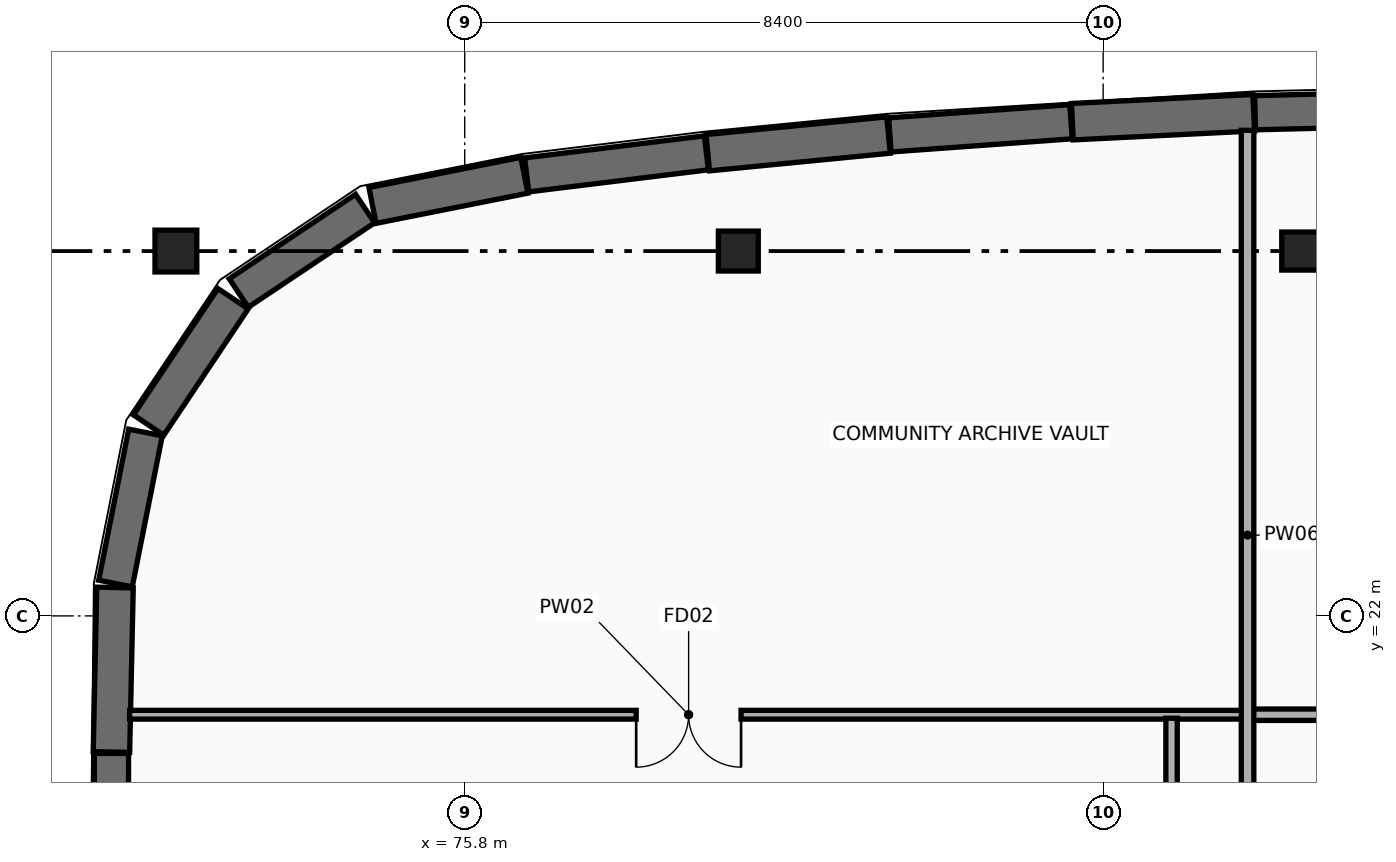
"""IFC4 building model, lengths in metres.
Left out: names, types, materials, properties, quantities, classifications, styles, units other than length and angle.
Written with IfcOpenShell. Run it as: python <this file> out.ifc"""

import sys

from ifc_helpers import new_model, si_unit, direction, frame, frame_2d, origin, origin_2d, place, context, subcontext, project, spatial, rectangle, extrude, element, fill, save


model = new_model("IFC4")
c1 = context("Model", 3, precision=1e-05, world=origin(), true_north=direction((0.0, 1.0)))
c2 = subcontext(c1, "Body", "Model", "MODEL_VIEW")
j1 = project(units=[si_unit("LENGTHUNIT", "METRE"), si_unit("PLANEANGLEUNIT", "RADIAN")], contexts=[c1])
p1 = place(None, origin())
s1 = spatial("IfcSite", under=j1, at=p1, CompositionType="ELEMENT")
p2 = place(p1, origin())
s2 = spatial("IfcBuilding", under=s1, at=p2, CompositionType="ELEMENT")
p3 = place(p2, frame((0.0, 0.0, -4.2)))
s3 = spatial("IfcBuildingStorey", under=s2, at=p3, CompositionType="ELEMENT", Elevation=-4.2)
p4 = place(p3, frame((72.0, 26.8, -0.415), z_axis=(0.0, 0.0, 1.0), x_axis=(1.0, 0.0, 0.0)))
e1 = element("IfcColumn", 1, at=p4, inside=s3, PredefinedType="COLUMN", context=c2, shape_type="SweptSolid", body=[
    extrude(rectangle(XDim=0.55, YDim=0.55, at=origin_2d()), origin(), (0.0, 0.0, 1.0), 4.615),
])
p5 = place(p3, frame((79.4, 26.8, -0.415), z_axis=(0.0, 0.0, 1.0), x_axis=(1.0, 0.0, 0.0)))
e2 = element("IfcColumn", 2, at=p5, inside=s3, PredefinedType="COLUMN", context=c2, shape_type="SweptSolid", body=[
    extrude(rectangle(XDim=0.525, YDim=0.525, at=origin_2d()), origin(), (0.0, 0.0, 1.0), 4.615),
])
p6 = place(p3, frame((86.8, 26.8, -0.415), z_axis=(0.0, 0.0, 1.0), x_axis=(1.0, 0.0, 0.0)))
e3 = element("IfcColumn", 3, at=p6, inside=s3, PredefinedType="COLUMN", context=c2, shape_type="SweptSolid", body=[
    extrude(rectangle(XDim=0.5, YDim=0.5, at=origin_2d()), origin(), (0.0, 0.0, 1.0), 4.615),
])
p7 = place(p3, frame((86.199, 28.62, 0.0), z_axis=(0.0, 0.0, 1.0), x_axis=(0.999706566975, 0.024223541189, 0.0)))
e4 = element("IfcWall", 4, at=p7, inside=s3, PredefinedType="STANDARD", context=c2, shape_type="SweptSolid", body=[
    extrude(rectangle(XDim=2.389, YDim=0.45, at=frame_2d((1.194, 0.0))), origin(), (0.0, 0.0, 1.0), 3.897),
])
p8 = place(p3, frame((83.795, 28.502, 0.0), z_axis=(0.0, 0.0, 1.0), x_axis=(0.998775928043, 0.049463578141, 0.0)))
e5 = element("IfcWall", 5, at=p8, inside=s3, PredefinedType="STANDARD", context=c2, shape_type="SweptSolid", body=[
    extrude(rectangle(XDim=2.389, YDim=0.48, at=frame_2d((1.194, 0.0))), origin(), (0.0, 0.0, 1.0), 3.897),
])
p9 = place(p3, frame((81.394, 28.328, 0.0), z_axis=(0.0, 0.0, 1.0), x_axis=(0.997372398559, 0.07244514195, 0.0)))
e6 = element("IfcWall", 6, at=p9, inside=s3, PredefinedType="STANDARD", context=c2, shape_type="SweptSolid", body=[
    extrude(rectangle(XDim=2.389, YDim=0.45, at=frame_2d((1.195, 0.0))), origin(), (0.0, 0.0, 1.0), 3.897),
])
p10 = place(p3, frame((78.998, 28.094, 0.0), z_axis=(0.0, 0.0, 1.0), x_axis=(0.995277042211, 0.097075276191, 0.0)))
e7 = element("IfcWall", 7, at=p10, inside=s3, PredefinedType="STANDARD", context=c2, shape_type="SweptSolid", body=[
    extrude(rectangle(XDim=2.389, YDim=0.48, at=frame_2d((1.195, 0.0))), origin(), (0.0, 0.0, 1.0), 3.897),
])
p11 = place(p3, frame((76.615, 27.802, 0.0), z_axis=(0.0, 0.0, 1.0), x_axis=(0.99256366712, 0.121726606435, 0.0)))
e8 = element("IfcWall", 8, at=p11, inside=s3, PredefinedType="STANDARD", context=c2, shape_type="SweptSolid", body=[
    extrude(rectangle(XDim=2.383, YDim=0.45, at=frame_2d((1.191, 0.0))), origin(), (0.0, 0.0, 1.0), 3.897),
])
p12 = place(p3, frame((74.587, 27.4, 0.0), z_axis=(0.0, 0.0, 1.0), x_axis=(0.980805885843, 0.194986702867, 0.0)))
e9 = element("IfcWall", 9, at=p12, inside=s3, PredefinedType="STANDARD", context=c2, shape_type="SweptSolid", body=[
    extrude(rectangle(XDim=2.037, YDim=0.48, at=frame_2d((1.019, 0.0))), origin(), (0.0, 0.0, 1.0), 3.897),
])
p13 = place(p3, frame((72.827, 26.248, 0.0), z_axis=(0.0, 0.0, 1.0), x_axis=(0.831410947249, 0.555658021443, 0.0)))
e10 = element("IfcWall", 10, at=p13, inside=s3, PredefinedType="STANDARD", context=c2, shape_type="SweptSolid", body=[
    extrude(rectangle(XDim=1.999, YDim=0.45, at=frame_2d((1.0, 0.0))), origin(), (0.0, 0.0, 1.0), 3.897),
])
p14 = place(p3, frame((71.641, 24.511, 0.0), z_axis=(0.0, 0.0, 1.0), x_axis=(0.555658021443, 0.831410947249, 0.0)))
e11 = element("IfcWall", 11, at=p14, inside=s3, PredefinedType="STANDARD", context=c2, shape_type="SweptSolid", body=[
    extrude(rectangle(XDim=1.999, YDim=0.48, at=frame_2d((1.0, 0.0))), origin(), (0.0, 0.0, 1.0), 3.897),
])
p15 = place(p3, frame((71.205, 22.426, 0.0), z_axis=(0.0, 0.0, 1.0), x_axis=(0.194980456149, 0.980807127686, 0.0)))
e12 = element("IfcWall", 12, at=p15, inside=s3, PredefinedType="STANDARD", context=c2, shape_type="SweptSolid", body=[
    extrude(rectangle(XDim=2.026, YDim=0.45, at=frame_2d((1.013, 0.0))), origin(), (0.0, 0.0, 1.0), 3.897),
])
p16 = place(p3, frame((71.152, 20.209, 0.0), z_axis=(0.0, 0.0, 1.0), x_axis=(0.021655570194, 0.999765490642, 0.0)))
e13 = element("IfcWall", 13, at=p16, inside=s3, PredefinedType="STANDARD", context=c2, shape_type="SweptSolid", body=[
    extrude(rectangle(XDim=2.165, YDim=0.48, at=frame_2d((1.082, 0.0))), origin(), (0.0, 0.0, 1.0), 3.897),
])
p17 = place(p3, frame((71.152, 18.009, 0.0), z_axis=(0.0, 0.0, 1.0), x_axis=(0.0, 1.0, 0.0)))
e14 = element("IfcWall", 14, at=p17, inside=s3, PredefinedType="STANDARD", context=c2, shape_type="SweptSolid", body=[
    extrude(rectangle(XDim=2.182, YDim=0.45, at=frame_2d((1.091, 0.0))), origin(), (0.0, 0.0, 1.0), 3.897),
])
p18 = place(p3, frame((86.1, 20.7, 0.0), z_axis=(0.0, 0.0, 1.0), x_axis=(-1.0, 0.0, 0.0)))
e15 = element("IfcWall", 15, at=p18, inside=s3, PredefinedType="PARTITIONING", context=c2, shape_type="SweptSolid", body=[
    extrude(rectangle(XDim=14.709, YDim=0.115, at=frame_2d((7.354, 0.0))), origin(), (0.0, 0.0, 1.0), 3.335),
])
p19 = place(p18, frame((6.664, 0.0, 0.0)))
e16 = element("IfcOpeningElement", 16, at=p19, cuts=e15, PredefinedType="OPENING", context=c2, shape_type="SweptSolid", body=[
    extrude(rectangle(XDim=1.38, YDim=2.2, at=frame_2d((0.69, 1.1))), frame((0.0, 0.067, 0.0), z_axis=(0.0, -1.0, 0.0), x_axis=(1.0, 0.0, 0.0)), (0.0, 0.0, 1.0), 0.135),
])
p20 = place(p3, frame((102.462, 20.7, 0.0), z_axis=(0.0, 0.0, 1.0), x_axis=(-1.0, 0.0, 0.0)))
e17 = element("IfcWall", 17, at=p20, inside=s3, PredefinedType="PARTITIONING", context=c2, shape_type="SweptSolid", body=[
    extrude(rectangle(XDim=16.362, YDim=0.15, at=frame_2d((8.181, 0.0))), origin(), (0.0, 0.0, 1.0), 3.235),
])
p21 = place(p20, frame((7.441, 0.0, 0.0)))
e18 = element("IfcOpeningElement", 18, at=p21, cuts=e17, PredefinedType="OPENING", context=c2, shape_type="SweptSolid", body=[
    extrude(rectangle(XDim=1.48, YDim=2.22, at=frame_2d((0.74, 1.11))), frame((0.0, 0.085, 0.0), z_axis=(0.0, -1.0, 0.0), x_axis=(1.0, 0.0, 0.0)), (0.0, 0.0, 1.0), 0.17),
])
p22 = place(p3, frame((85.1, 9.862, 0.0), z_axis=(0.0, 0.0, 1.0), x_axis=(0.0, 1.0, 0.0)))
e19 = element("IfcWall", 19, at=p22, inside=s3, PredefinedType="PARTITIONING", context=c2, shape_type="SweptSolid", body=[
    extrude(rectangle(XDim=10.792, YDim=0.15, at=frame_2d((5.396, 0.0))), origin(), (0.0, 0.0, 1.0), 3.479),
])
p23 = place(p3, frame((86.1, 17.738, 0.0), z_axis=(0.0, 0.0, 1.0), x_axis=(0.0, 1.0, 0.0)))
e20 = element("IfcWall", 20, at=p23, inside=s3, PredefinedType="PARTITIONING", context=c2, shape_type="SweptSolid", body=[
    extrude(rectangle(XDim=10.65, YDim=0.165, at=frame_2d((5.325, 0.0))), origin(), (0.0, 0.0, 1.0), 3.476),
])
p24 = place(p19, origin())
e21 = element("IfcDoor", 21, at=p24, inside=s3, OperationType="DOUBLE_DOOR_SINGLE_SWING", PredefinedType="DOOR", context=c2, shape_type="SweptSolid", body=[
    extrude(rectangle(XDim=1.38, YDim=2.2, at=frame_2d((0.69, 1.1))), frame((0.0, 0.025, 0.0), z_axis=(0.0, -1.0, 0.0), x_axis=(1.0, 0.0, 0.0)), (0.0, 0.0, 1.0), 0.05),
])
fill(e16, e21)
save(model, sys.argv[1])
